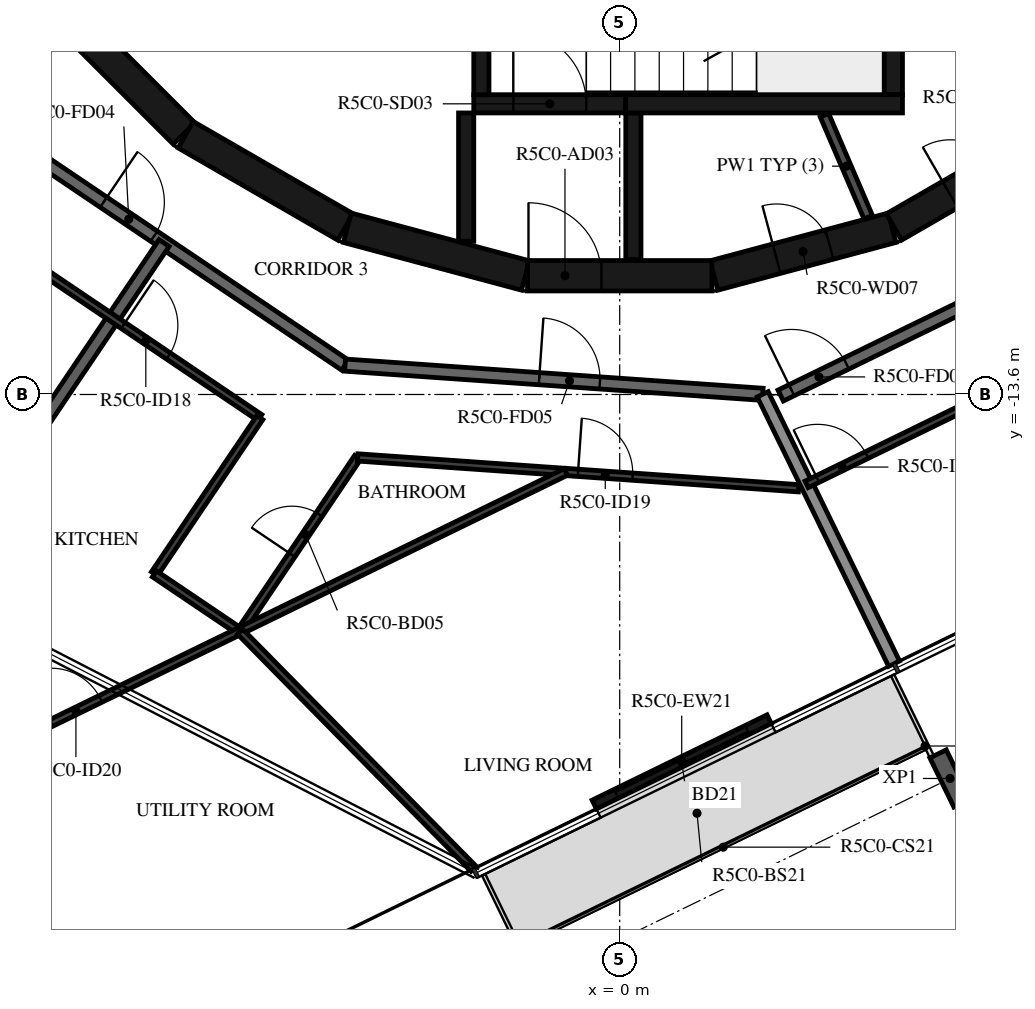
"""IFC4 building model, lengths in metres.
Left out: names, types, materials, properties, quantities, classifications, styles, units other than length and angle.
Written with IfcOpenShell. Run it as: python <this file> out.ifc"""

import sys

from ifc_helpers import new_model, si_unit, direction, frame, frame_2d, origin, origin_2d, place, context, subcontext, project, spatial, rectangle, i_section, extrude, element, fill, save


model = new_model("IFC4")
c1 = context("Model", 3, precision=1e-05, world=origin(), true_north=direction((0.0, 1.0)))
c2 = subcontext(c1, "Body", "Model", "MODEL_VIEW")
j1 = project(units=[si_unit("LENGTHUNIT", "METRE"), si_unit("PLANEANGLEUNIT", "RADIAN")], contexts=[c1])
p1 = place(None, origin())
s1 = spatial("IfcSite", under=j1, at=p1, CompositionType="ELEMENT")
p2 = place(p1, origin())
s2 = spatial("IfcBuilding", under=s1, at=p2, CompositionType="ELEMENT")
p3 = place(p2, frame((0.0, 0.0, 209.4)))
s3 = spatial("IfcBuildingStorey", under=s2, at=p3, CompositionType="ELEMENT", Elevation=209.4)
p4 = place(p3, frame((5.433, -19.915, -0.38), z_axis=(0.0, 0.0, 1.0), x_axis=(-0.898794095235, -0.438371046456, 0.0)))
e1 = element("IfcColumn", 1, at=p4, inside=s3, PredefinedType="COLUMN", context=c2, shape_type="SweptSolid", body=[
    extrude(i_section(OverallWidth=0.3, OverallDepth=0.9, WebThickness=0.019, FlangeThickness=0.035, FilletRadius=0.03, at=origin_2d()), origin(), (0.0, 0.0, 1.0), 3.5),
])
p5 = place(p3, frame((-0.418, -20.343, 0.0), z_axis=(0.0, 0.0, 1.0), x_axis=(0.898778711213, 0.43840258698, 0.0)))
e2 = element("IfcWall", 2, at=p5, inside=s3, PredefinedType="STANDARD", context=c2, shape_type="SweptSolid", body=[
    extrude(rectangle(XDim=3.2, YDim=0.16, at=frame_2d((1.6, 0.0))), origin(), (0.0, 0.0, 1.0), 3.12),
])
p6 = place(p5, frame((0.4, 0.0, 0.0)))
e3 = element("IfcOpeningElement", 3, at=p6, cuts=e2, PredefinedType="OPENING", context=c2, shape_type="SweptSolid", body=[
    extrude(rectangle(XDim=2.4, YDim=2.4, at=frame_2d((1.2, 1.2))), frame((0.0, 0.09, 0.0), z_axis=(0.0, -1.0, 0.0), x_axis=(1.0, 0.0, 0.0)), (0.0, 0.0, 1.0), 0.18),
])
p7 = place(p3, frame((1.55, -11.643, 0.0), z_axis=(0.0, 0.0, 1.0), x_axis=(0.965948410781, 0.258734743916, 0.0)))
e4 = element("IfcWall", 4, at=p7, inside=s3, PredefinedType="SHEAR", context=c2, shape_type="SweptSolid", body=[
    extrude(rectangle(XDim=3.033, YDim=0.5, at=frame_2d((1.516, 0.0))), origin(), (0.0, 0.0, 1.0), 3.12),
])
p8 = place(p7, frame((1.066, 0.0, 0.0)))
e5 = element("IfcOpeningElement", 5, at=p8, cuts=e4, PredefinedType="OPENING", context=c2, shape_type="SweptSolid", body=[
    extrude(rectangle(XDim=0.9, YDim=2.1, at=frame_2d((0.45, 1.05))), frame((0.0, 0.26, 0.0), z_axis=(0.0, -1.0, 0.0), x_axis=(1.0, 0.0, 0.0)), (0.0, 0.0, 1.0), 0.52),
])
p9 = place(p3, frame((4.51, -10.845, 0.0), z_axis=(0.0, 0.0, 1.0), x_axis=(0.865975092491, 0.500087131594, 0.0)))
e6 = element("IfcWall", 6, at=p9, inside=s3, PredefinedType="SHEAR", context=c2, shape_type="SweptSolid", body=[
    extrude(rectangle(XDim=3.033, YDim=0.5, at=frame_2d((1.516, 0.0))), origin(), (0.0, 0.0, 1.0), 3.12),
])
p10 = place(p9, frame((1.066, 0.0, 0.0)))
e7 = element("IfcOpeningElement", 7, at=p10, cuts=e6, PredefinedType="OPENING", context=c2, shape_type="SweptSolid", body=[
    extrude(rectangle(XDim=0.9, YDim=2.1, at=frame_2d((0.45, 1.05))), frame((0.0, 0.26, 0.0), z_axis=(0.0, -1.0, 0.0), x_axis=(1.0, 0.0, 0.0)), (0.0, 0.0, 1.0), 0.52),
])
p11 = place(p3, frame((-9.308, -7.164, 0.0), z_axis=(0.0, 0.0, 1.0), x_axis=(0.707106781187, -0.707106781187, 0.0)))
e8 = element("IfcWall", 8, at=p11, inside=s3, PredefinedType="SHEAR", context=c2, shape_type="SweptSolid", body=[
    extrude(rectangle(XDim=3.032, YDim=0.5, at=frame_2d((1.516, 0.0))), origin(), (0.0, 0.0, 1.0), 3.12),
])
for number, where, z_axis, x_axis in (
    (9, (-7.137, -9.329, 0.0), (0.0, 0.0, 1.0), (0.866, -0.5, 0.0)),
    (10, (-4.479, -10.858, 0.0), (0.0, 0.0, 1.0), (0.966, -0.259, 0.0)),
):
    element("IfcWall", number, at=place(p3, frame(where, z_axis=z_axis, x_axis=x_axis)), inside=s3, PredefinedType="SHEAR", context=c2, shape_type="SweptSolid", body=[
        extrude(rectangle(XDim=3.033, YDim=0.5, at=frame_2d((1.516, 0.0))), origin(), (0.0, 0.0, 1.0), 3.12),
    ])
p12 = place(p3, frame((-1.516, -11.647, 0.0), z_axis=(0.0, 0.0, 1.0), x_axis=(1.0, 0.0, 0.0)))
e11 = element("IfcWall", 11, at=p12, inside=s3, PredefinedType="SHEAR", context=c2, shape_type="SweptSolid", body=[
    extrude(rectangle(XDim=3.033, YDim=0.5, at=frame_2d((1.516, 0.0))), origin(), (0.0, 0.0, 1.0), 3.12),
])
p13 = place(p12, frame((0.016, 0.0, 0.0)))
e12 = element("IfcOpeningElement", 12, at=p13, cuts=e11, PredefinedType="OPENING", context=c2, shape_type="SweptSolid", body=[
    extrude(rectangle(XDim=1.2, YDim=2.1, at=frame_2d((0.6, 1.05))), frame((0.0, 0.26, 0.0), z_axis=(0.0, -1.0, 0.0), x_axis=(1.0, 0.0, 0.0)), (0.0, 0.0, 1.0), 0.52),
])
p14 = place(p3, frame((-2.275, -8.67, 0.0), z_axis=(0.0, 0.0, 1.0), x_axis=(0.0, 1.0, 0.0)))
e13 = element("IfcWall", 13, at=p14, inside=s3, PredefinedType="SHEAR", context=c2, shape_type="SweptSolid", body=[
    extrude(rectangle(XDim=3.32, YDim=0.25, at=frame_2d((1.66, 0.0))), origin(), (0.0, 0.0, 1.0), 3.12),
])
p15 = place(p3, frame((4.5, -8.67, 0.0), z_axis=(0.0, 0.0, 1.0), x_axis=(0.0, 1.0, 0.0)))
e14 = element("IfcWall", 14, at=p15, inside=s3, PredefinedType="SHEAR", context=c2, shape_type="SweptSolid", body=[
    extrude(rectangle(XDim=3.32, YDim=0.3, at=frame_2d((1.66, 0.0))), origin(), (0.0, 0.0, 1.0), 3.12),
])
p16 = place(p3, frame((0.1, -8.82, 0.0), z_axis=(0.0, 0.0, 1.0), x_axis=(1.0, 0.0, 0.0)))
e15 = element("IfcWall", 15, at=p16, inside=s3, PredefinedType="SHEAR", context=c2, shape_type="SweptSolid", body=[
    extrude(rectangle(XDim=4.55, YDim=0.3, at=frame_2d((2.275, 0.0))), origin(), (0.0, 0.0, 1.0), 3.12),
])
p17 = place(p3, frame((-2.4, -8.82, 0.0), z_axis=(0.0, 0.0, 1.0), x_axis=(1.0, 0.0, 0.0)))
e16 = element("IfcWall", 16, at=p17, inside=s3, PredefinedType="SHEAR", context=c2, shape_type="SweptSolid", body=[
    extrude(rectangle(XDim=2.5, YDim=0.3, at=frame_2d((1.25, 0.0))), origin(), (0.0, 0.0, 1.0), 3.12),
])
p18 = place(p17, frame((0.65, 0.0, 0.0)))
e17 = element("IfcOpeningElement", 17, at=p18, cuts=e16, PredefinedType="OPENING", context=c2, shape_type="SweptSolid", body=[
    extrude(rectangle(XDim=1.2, YDim=2.1, at=frame_2d((0.6, 1.05))), frame((0.0, 0.16, 0.0), z_axis=(0.0, -1.0, 0.0), x_axis=(1.0, 0.0, 0.0)), (0.0, 0.0, 1.0), 0.32),
])
p19 = place(p3, frame((-2.525, -8.97, 0.0), z_axis=(0.0, 0.0, 1.0), x_axis=(0.0, -1.0, 0.0)))
e18 = element("IfcWall", 18, at=p19, inside=s3, PredefinedType="SHEAR", context=c2, shape_type="SweptSolid", body=[
    extrude(rectangle(XDim=2.11, YDim=0.25, at=frame_2d((1.055, 0.0))), origin(), (0.0, 0.0, 1.0), 3.12),
])
p20 = place(p3, frame((0.225, -8.97, 0.0), z_axis=(0.0, 0.0, 1.0), x_axis=(0.0, -1.0, 0.0)))
e19 = element("IfcWall", 19, at=p20, inside=s3, PredefinedType="SHEAR", context=c2, shape_type="SweptSolid", body=[
    extrude(rectangle(XDim=2.41, YDim=0.25, at=frame_2d((1.205, 0.0))), origin(), (0.0, 0.0, 1.0), 3.12),
])
p21 = place(p3, frame((7.842, -8.248, 0.0), z_axis=(0.0, 0.0, 1.0), x_axis=(-0.66446128181, 0.747322691329, 0.0)))
e20 = element("IfcWall", 20, at=p21, inside=s3, PredefinedType="PARTITIONING", context=c2, shape_type="SweptSolid", body=[
    extrude(rectangle(XDim=4.198, YDim=0.15, at=frame_2d((2.099, 0.0))), origin(), (0.0, 0.0, 1.0), 3.12),
])
p22 = place(p3, frame((3.367, -9.007, 0.0), z_axis=(0.0, 0.0, 1.0), x_axis=(0.394387482265, -0.918944238696, 0.0)))
e21 = element("IfcWall", 21, at=p22, inside=s3, PredefinedType="PARTITIONING", context=c2, shape_type="SweptSolid", body=[
    extrude(rectangle(XDim=1.825, YDim=0.15, at=frame_2d((0.913, 0.0))), origin(), (0.0, 0.0, 1.0), 3.12),
])
p23 = place(p3, frame((-10.47, -9.101, 0.0), z_axis=(0.0, 0.0, 1.0), x_axis=(0.829035841718, -0.559195469534, 0.0)))
e22 = element("IfcWall", 22, at=p23, inside=s3, PredefinedType="STANDARD", context=c2, shape_type="SweptSolid", body=[
    extrude(rectangle(XDim=7.181, YDim=0.2, at=frame_2d((3.591, 0.0))), origin(), (0.0, 0.0, 1.0), 3.12),
])
p24 = place(p23, frame((2.39, 0.0, 0.0)))
e23 = element("IfcOpeningElement", 23, at=p24, cuts=e22, PredefinedType="OPENING", context=c2, shape_type="SweptSolid", body=[
    extrude(rectangle(XDim=1.0, YDim=2.1, at=frame_2d((0.5, 1.05))), frame((0.0, 0.11, 0.0), z_axis=(0.0, -1.0, 0.0), x_axis=(1.0, 0.0, 0.0)), (0.0, 0.0, 1.0), 0.22),
])
p25 = place(p3, frame((-4.517, -13.117, 0.0), z_axis=(0.0, 0.0, 1.0), x_axis=(0.997564669554, -0.069747616856, 0.0)))
e24 = element("IfcWall", 24, at=p25, inside=s3, PredefinedType="STANDARD", context=c2, shape_type="SweptSolid", body=[
    extrude(rectangle(XDim=6.885, YDim=0.2, at=frame_2d((3.443, 0.0))), origin(), (0.0, 0.0, 1.0), 3.12),
])
p26 = place(p25, frame((3.2, 0.0, 0.0)))
e25 = element("IfcOpeningElement", 25, at=p26, cuts=e24, PredefinedType="OPENING", context=c2, shape_type="SweptSolid", body=[
    extrude(rectangle(XDim=1.0, YDim=2.1, at=frame_2d((0.5, 1.05))), frame((0.0, 0.11, 0.0), z_axis=(0.0, -1.0, 0.0), x_axis=(1.0, 0.0, 0.0)), (0.0, 0.0, 1.0), 0.22),
])
p27 = place(p3, frame((2.647, -13.618, 0.0), z_axis=(0.0, 0.0, 1.0), x_axis=(0.898796543751, 0.438366026218, 0.0)))
e26 = element("IfcWall", 26, at=p27, inside=s3, PredefinedType="STANDARD", context=c2, shape_type="SweptSolid", body=[
    extrude(rectangle(XDim=7.181, YDim=0.2, at=frame_2d((3.591, 0.0))), origin(), (0.0, 0.0, 1.0), 3.12),
])
p28 = place(p27, frame((0.2, 0.0, 0.0)))
e27 = element("IfcOpeningElement", 27, at=p28, cuts=e26, PredefinedType="OPENING", context=c2, shape_type="SweptSolid", body=[
    extrude(rectangle(XDim=1.0, YDim=2.1, at=frame_2d((0.5, 1.05))), frame((0.0, 0.11, 0.0), z_axis=(0.0, -1.0, 0.0), x_axis=(1.0, 0.0, 0.0)), (0.0, 0.0, 1.0), 0.22),
])
p29 = place(p3, frame((-10.408, -15.43, 0.0), z_axis=(0.0, 0.0, 1.0), x_axis=(0.559199317758, 0.829033246027, 0.0)))
e28 = element("IfcWall", 28, at=p29, inside=s3, PredefinedType="STANDARD", context=c2, shape_type="SweptSolid", body=[
    extrude(rectangle(XDim=5.212, YDim=0.2, at=frame_2d((2.606, 0.0))), origin(), (0.0, 0.0, 1.0), 3.12),
])
p30 = place(p3, frame((4.512, -18.027, 0.0), z_axis=(0.0, 0.0, 1.0), x_axis=(-0.438374835386, 0.898792247241, 0.0)))
e29 = element("IfcWall", 29, at=p30, inside=s3, PredefinedType="STANDARD", context=c2, shape_type="SweptSolid", body=[
    extrude(rectangle(XDim=4.929, YDim=0.2, at=frame_2d((2.464, 0.0))), origin(), (0.0, 0.0, 1.0), 2.73),
])
p31 = place(p3, frame((-11.642, -10.12, 0.0), z_axis=(0.0, 0.0, 1.0), x_axis=(0.829029427133, -0.559204979365, 0.0)))
e30 = element("IfcWall", 30, at=p31, inside=s3, PredefinedType="PARTITIONING", context=c2, shape_type="SweptSolid", body=[
    extrude(rectangle(XDim=6.904, YDim=0.12, at=frame_2d((3.452, 0.0))), origin(), (0.0, 0.0, 1.0), 3.12),
])
p32 = place(p31, frame((0.2, 0.0, 0.0)))
e31 = element("IfcOpeningElement", 31, at=p32, cuts=e30, PredefinedType="OPENING", context=c2, shape_type="SweptSolid", body=[
    extrude(rectangle(XDim=0.9, YDim=2.1, at=frame_2d((0.45, 1.05))), frame((0.0, 0.07, 0.0), z_axis=(0.0, -1.0, 0.0), x_axis=(1.0, 0.0, 0.0)), (0.0, 0.0, 1.0), 0.14),
])
p33 = place(p31, frame((4.192, 0.0, 0.0)))
e32 = element("IfcOpeningElement", 32, at=p33, cuts=e30, PredefinedType="OPENING", context=c2, shape_type="SweptSolid", body=[
    extrude(rectangle(XDim=0.9, YDim=2.1, at=frame_2d((0.45, 1.05))), frame((0.0, 0.07, 0.0), z_axis=(0.0, -1.0, 0.0), x_axis=(1.0, 0.0, 0.0)), (0.0, 0.0, 1.0), 0.14),
])
p34 = place(p3, frame((-5.918, -13.981, 0.0), z_axis=(0.0, 0.0, 1.0), x_axis=(-0.559254999968, -0.828995684555, 0.0)))
e33 = element("IfcWall", 33, at=p34, inside=s3, PredefinedType="PARTITIONING", context=c2, shape_type="SweptSolid", body=[
    extrude(rectangle(XDim=3.099, YDim=0.12, at=frame_2d((1.55, 0.0))), origin(), (0.0, 0.0, 1.0), 3.12),
])
p35 = place(p3, frame((-7.652, -16.55, 0.0), z_axis=(0.0, 0.0, 1.0), x_axis=(0.829053397483, -0.559169441334, 0.0)))
e34 = element("IfcWall", 34, at=p35, inside=s3, PredefinedType="PARTITIONING", context=c2, shape_type="SweptSolid", body=[
    extrude(rectangle(XDim=1.686, YDim=0.12, at=frame_2d((0.843, 0.0))), origin(), (0.0, 0.0, 1.0), 3.12),
])
p36 = place(p3, frame((-6.229, -17.48, 0.0), z_axis=(0.0, 0.0, 1.0), x_axis=(0.559206483048, 0.829028412853, 0.0)))
e35 = element("IfcWall", 35, at=p36, inside=s3, PredefinedType="PARTITIONING", context=c2, shape_type="SweptSolid", body=[
    extrude(rectangle(XDim=3.432, YDim=0.12, at=frame_2d((1.716, 0.0))), origin(), (0.0, 0.0, 1.0), 3.12),
])
p37 = place(p36, frame((1.5, 0.0, 0.0)))
e36 = element("IfcOpeningElement", 36, at=p37, cuts=e35, PredefinedType="OPENING", context=c2, shape_type="SweptSolid", body=[
    extrude(rectangle(XDim=0.8, YDim=2.1, at=frame_2d((0.4, 1.05))), frame((0.0, 0.07, 0.0), z_axis=(0.0, -1.0, 0.0), x_axis=(1.0, 0.0, 0.0)), (0.0, 0.0, 1.0), 0.14),
])
p38 = place(p3, frame((-4.309, -14.635, 0.0), z_axis=(0.0, 0.0, 1.0), x_axis=(0.997564788147, -0.069745920658, 0.0)))
e37 = element("IfcWall", 37, at=p38, inside=s3, PredefinedType="PARTITIONING", context=c2, shape_type="SweptSolid", body=[
    extrude(rectangle(XDim=7.271, YDim=0.12, at=frame_2d((3.635, 0.0))), origin(), (0.0, 0.0, 1.0), 3.12),
])
p39 = place(p38, frame((3.632, 0.0, 0.0)))
e38 = element("IfcOpeningElement", 38, at=p39, cuts=e37, PredefinedType="OPENING", context=c2, shape_type="SweptSolid", body=[
    extrude(rectangle(XDim=0.9, YDim=2.1, at=frame_2d((0.45, 1.05))), frame((0.0, 0.07, 0.0), z_axis=(0.0, -1.0, 0.0), x_axis=(1.0, 0.0, 0.0)), (0.0, 0.0, 1.0), 0.14),
])
p40 = place(p3, frame((-9.886, -19.264, 0.0), z_axis=(0.0, 0.0, 1.0), x_axis=(0.898796326112, 0.43836647245, 0.0)))
e39 = element("IfcWall", 39, at=p40, inside=s3, PredefinedType="PARTITIONING", context=c2, shape_type="SweptSolid", body=[
    extrude(rectangle(XDim=10.014, YDim=0.12, at=frame_2d((5.007, 0.0))), origin(), (0.0, 0.0, 1.0), 3.12),
])
p41 = place(p40, frame((0.6, 0.0, 0.0)))
e40 = element("IfcOpeningElement", 40, at=p41, cuts=e39, PredefinedType="OPENING", context=c2, shape_type="SweptSolid", body=[
    extrude(rectangle(XDim=0.9, YDim=2.1, at=frame_2d((0.45, 1.05))), frame((0.0, 0.07, 0.0), z_axis=(0.0, -1.0, 0.0), x_axis=(1.0, 0.0, 0.0)), (0.0, 0.0, 1.0), 0.14),
])
p42 = place(p3, frame((-9.072, -24.489, 0.0), z_axis=(0.0, 0.0, 1.0), x_axis=(-0.291025348593, 0.956715342449, 0.0)))
e41 = element("IfcWall", 41, at=p42, inside=s3, PredefinedType="PARTITIONING", context=c2, shape_type="SweptSolid", body=[
    extrude(rectangle(XDim=5.205, YDim=0.12, at=frame_2d((2.602, 0.0))), origin(), (0.0, 0.0, 1.0), 3.12),
])
p43 = place(p42, frame((0.2, 0.0, 0.0)))
e42 = element("IfcOpeningElement", 42, at=p43, cuts=e41, PredefinedType="OPENING", context=c2, shape_type="SweptSolid", body=[
    extrude(rectangle(XDim=0.9, YDim=2.1, at=frame_2d((0.45, 1.05))), frame((0.0, 0.07, 0.0), z_axis=(0.0, -1.0, 0.0), x_axis=(1.0, 0.0, 0.0)), (0.0, 0.0, 1.0), 0.14),
])
p44 = place(p3, frame((-2.403, -21.4, 0.0), z_axis=(0.0, 0.0, 1.0), x_axis=(-0.70162063199, 0.712550692067, 0.0)))
e43 = element("IfcWall", 43, at=p44, inside=s3, PredefinedType="PARTITIONING", context=c2, shape_type="SweptSolid", body=[
    extrude(rectangle(XDim=5.472, YDim=0.12, at=frame_2d((2.736, 0.0))), origin(), (0.0, 0.0, 1.0), 3.12),
])
p45 = place(p3, frame((3.074, -15.078, 0.0), z_axis=(0.0, 0.0, 1.0), x_axis=(0.898800770739, 0.438357359377, 0.0)))
e44 = element("IfcWall", 44, at=p45, inside=s3, PredefinedType="PARTITIONING", context=c2, shape_type="SweptSolid", body=[
    extrude(rectangle(XDim=7.694, YDim=0.12, at=frame_2d((3.847, 0.0))), origin(), (0.0, 0.0, 1.0), 3.12),
])
p46 = place(p45, frame((0.2, 0.0, 0.0)))
e45 = element("IfcOpeningElement", 45, at=p46, cuts=e44, PredefinedType="OPENING", context=c2, shape_type="SweptSolid", body=[
    extrude(rectangle(XDim=0.9, YDim=2.1, at=frame_2d((0.45, 1.05))), frame((0.0, 0.07, 0.0), z_axis=(0.0, -1.0, 0.0), x_axis=(1.0, 0.0, 0.0)), (0.0, 0.0, 1.0), 0.14),
])
p47 = place(p6, origin())
e46 = element("IfcDoor", 46, at=p47, inside=s3, OperationType="DOUBLE_DOOR_SLIDING", PredefinedType="DOOR", context=c2, shape_type="SweptSolid", body=[
    extrude(rectangle(XDim=2.4, YDim=2.4, at=frame_2d((1.2, 1.2))), frame((0.0, 0.025, 0.0), z_axis=(0.0, -1.0, 0.0), x_axis=(1.0, 0.0, 0.0)), (0.0, 0.0, 1.0), 0.05),
])
fill(e3, e46)
p48 = place(p18, origin())
e47 = element("IfcDoor", 47, at=p48, inside=s3, OperationType="SINGLE_SWING_LEFT", PredefinedType="DOOR", context=c2, shape_type="SweptSolid", body=[
    extrude(rectangle(XDim=1.2, YDim=2.1, at=frame_2d((0.6, 1.05))), frame((0.0, 0.025, 0.0), z_axis=(0.0, -1.0, 0.0), x_axis=(1.0, 0.0, 0.0)), (0.0, 0.0, 1.0), 0.05),
])
fill(e17, e47)
p49 = place(p13, origin())
e48 = element("IfcDoor", 48, at=p49, inside=s3, OperationType="SINGLE_SWING_RIGHT", PredefinedType="DOOR", context=c2, shape_type="SweptSolid", body=[
    extrude(rectangle(XDim=1.2, YDim=2.1, at=frame_2d((0.6, 1.05))), frame((0.0, 0.025, 0.0), z_axis=(0.0, -1.0, 0.0), x_axis=(1.0, 0.0, 0.0)), (0.0, 0.0, 1.0), 0.05),
])
fill(e12, e48)
p50 = place(p8, origin())
e49 = element("IfcDoor", 49, at=p50, inside=s3, OperationType="SINGLE_SWING_LEFT", PredefinedType="DOOR", context=c2, shape_type="SweptSolid", body=[
    extrude(rectangle(XDim=0.9, YDim=2.1, at=frame_2d((0.45, 1.05))), frame((0.0, 0.025, 0.0), z_axis=(0.0, -1.0, 0.0), x_axis=(1.0, 0.0, 0.0)), (0.0, 0.0, 1.0), 0.05),
])
fill(e5, e49)
p51 = place(p10, origin())
e50 = element("IfcDoor", 50, at=p51, inside=s3, OperationType="SINGLE_SWING_RIGHT", PredefinedType="DOOR", context=c2, shape_type="SweptSolid", body=[
    extrude(rectangle(XDim=0.9, YDim=2.1, at=frame_2d((0.45, 1.05))), frame((0.0, 0.025, 0.0), z_axis=(0.0, -1.0, 0.0), x_axis=(1.0, 0.0, 0.0)), (0.0, 0.0, 1.0), 0.05),
])
fill(e7, e50)
p52 = place(p24, origin())
e51 = element("IfcDoor", 51, at=p52, inside=s3, OperationType="SINGLE_SWING_RIGHT", PredefinedType="DOOR", context=c2, shape_type="SweptSolid", body=[
    extrude(rectangle(XDim=1.0, YDim=2.1, at=frame_2d((0.5, 1.05))), frame((0.0, 0.025, 0.0), z_axis=(0.0, -1.0, 0.0), x_axis=(1.0, 0.0, 0.0)), (0.0, 0.0, 1.0), 0.05),
])
fill(e23, e51)
p53 = place(p26, origin())
e52 = element("IfcDoor", 52, at=p53, inside=s3, OperationType="SINGLE_SWING_LEFT", PredefinedType="DOOR", context=c2, shape_type="SweptSolid", body=[
    extrude(rectangle(XDim=1.0, YDim=2.1, at=frame_2d((0.5, 1.05))), frame((0.0, 0.025, 0.0), z_axis=(0.0, -1.0, 0.0), x_axis=(1.0, 0.0, 0.0)), (0.0, 0.0, 1.0), 0.05),
])
fill(e25, e52)
p54 = place(p33, origin())
e53 = element("IfcDoor", 53, at=p54, inside=s3, OperationType="SINGLE_SWING_LEFT", PredefinedType="DOOR", context=c2, shape_type="SweptSolid", body=[
    extrude(rectangle(XDim=0.9, YDim=2.1, at=frame_2d((0.45, 1.05))), frame((0.0, 0.025, 0.0), z_axis=(0.0, -1.0, 0.0), x_axis=(1.0, 0.0, 0.0)), (0.0, 0.0, 1.0), 0.05),
])
fill(e32, e53)
p55 = place(p37, origin())
e54 = element("IfcDoor", 54, at=p55, inside=s3, OperationType="SINGLE_SWING_LEFT", PredefinedType="DOOR", context=c2, shape_type="SweptSolid", body=[
    extrude(rectangle(XDim=0.8, YDim=2.1, at=frame_2d((0.4, 1.05))), frame((0.0, 0.025, 0.0), z_axis=(0.0, -1.0, 0.0), x_axis=(1.0, 0.0, 0.0)), (0.0, 0.0, 1.0), 0.05),
])
fill(e36, e54)
p56 = place(p39, origin())
e55 = element("IfcDoor", 55, at=p56, inside=s3, OperationType="SINGLE_SWING_LEFT", PredefinedType="DOOR", context=c2, shape_type="SweptSolid", body=[
    extrude(rectangle(XDim=0.9, YDim=2.1, at=frame_2d((0.45, 1.05))), frame((0.0, 0.025, 0.0), z_axis=(0.0, -1.0, 0.0), x_axis=(1.0, 0.0, 0.0)), (0.0, 0.0, 1.0), 0.05),
])
fill(e38, e55)
p57 = place(p41, origin())
e56 = element("IfcDoor", 56, at=p57, inside=s3, OperationType="SINGLE_SWING_LEFT", PredefinedType="DOOR", context=c2, shape_type="SweptSolid", body=[
    extrude(rectangle(XDim=0.9, YDim=2.1, at=frame_2d((0.45, 1.05))), frame((0.0, 0.025, 0.0), z_axis=(0.0, -1.0, 0.0), x_axis=(1.0, 0.0, 0.0)), (0.0, 0.0, 1.0), 0.05),
])
fill(e40, e56)
p58 = place(p28, origin())
e57 = element("IfcDoor", 57, at=p58, inside=s3, OperationType="SINGLE_SWING_LEFT", PredefinedType="DOOR", context=c2, shape_type="SweptSolid", body=[
    extrude(rectangle(XDim=1.0, YDim=2.1, at=frame_2d((0.5, 1.05))), frame((0.0, 0.025, 0.0), z_axis=(0.0, -1.0, 0.0), x_axis=(1.0, 0.0, 0.0)), (0.0, 0.0, 1.0), 0.05),
])
fill(e27, e57)
p59 = place(p46, origin())
e58 = element("IfcDoor", 58, at=p59, inside=s3, OperationType="SINGLE_SWING_LEFT", PredefinedType="DOOR", context=c2, shape_type="SweptSolid", body=[
    extrude(rectangle(XDim=0.9, YDim=2.1, at=frame_2d((0.45, 1.05))), frame((0.0, 0.025, 0.0), z_axis=(0.0, -1.0, 0.0), x_axis=(1.0, 0.0, 0.0)), (0.0, 0.0, 1.0), 0.05),
])
fill(e45, e58)
save(model, sys.argv[1])
